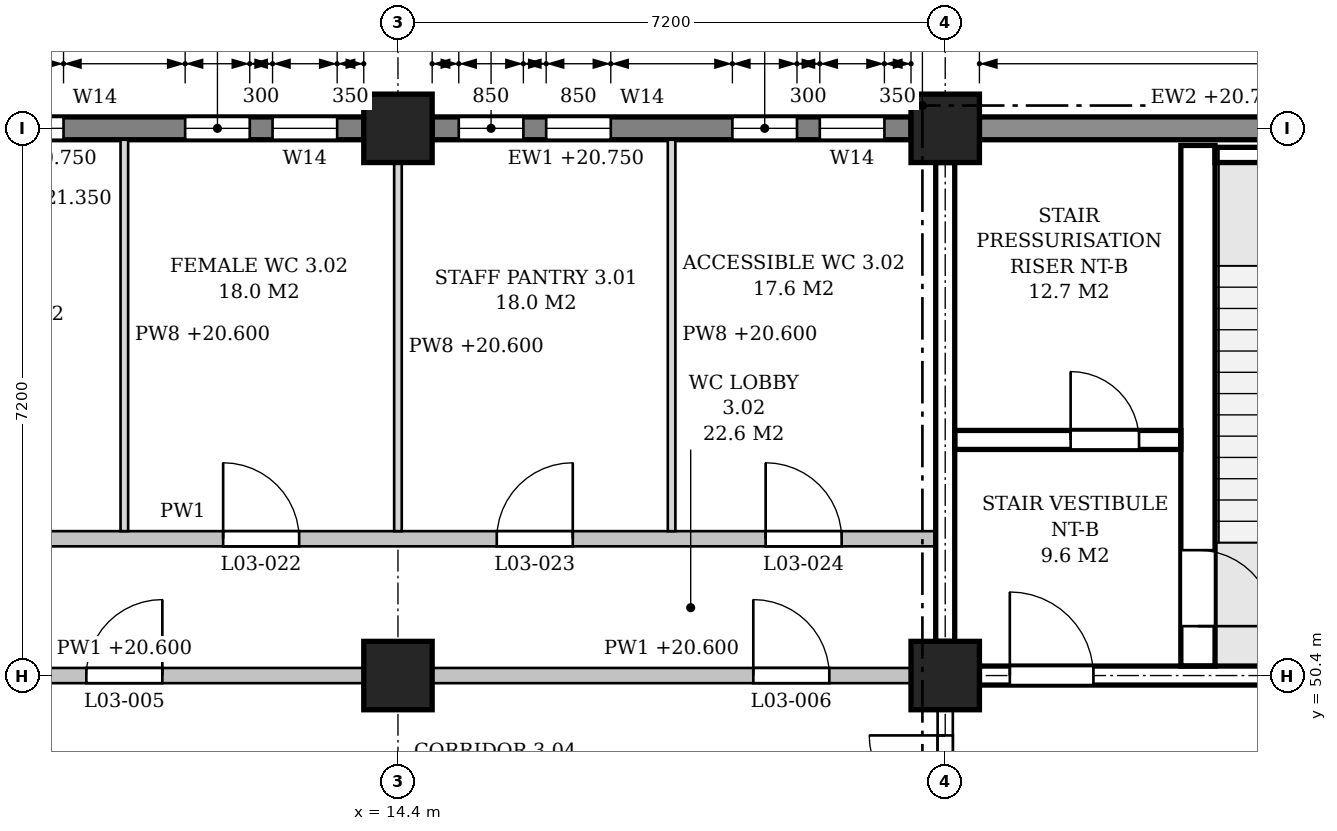
"""IFC4 building model, lengths in metres.
Left out: names, types, materials, properties, quantities, classifications, styles, units other than length and angle.
Written with IfcOpenShell. Run it as: python <this file> out.ifc"""

import sys

from ifc_helpers import new_model, si_unit, direction, frame, frame_2d, origin, origin_2d, place, context, subcontext, project, spatial, polyline, rectangle, outline, extrude, element, fill, save


model = new_model("IFC4")
c1 = context("Model", 3, precision=1e-05, world=origin(), true_north=direction((0.0, 1.0)))
c2 = subcontext(c1, "Body", "Model", "MODEL_VIEW")
j1 = project(units=[si_unit("LENGTHUNIT", "METRE"), si_unit("PLANEANGLEUNIT", "RADIAN")], contexts=[c1])
p1 = place(None, origin())
s1 = spatial("IfcSite", under=j1, at=p1, CompositionType="ELEMENT")
p2 = place(p1, origin())
s2 = spatial("IfcBuilding", under=s1, at=p2, CompositionType="ELEMENT")
p3 = place(p2, frame((0.0, 0.0, 16.8)))
s3 = spatial("IfcBuildingStorey", under=s2, at=p3, CompositionType="ELEMENT", Elevation=16.8)
for number, where, z_axis, x_axis in (
    (1, (14.4, 50.4, 0.0), (0.0, 0.0, 1.0), (1.0, 0.0, 0.0)),
    (2, (14.4, 57.6, 0.0), (0.0, 0.0, 1.0), (1.0, 0.0, 0.0)),
    (3, (21.6, 50.4, 0.0), (0.0, 0.0, 1.0), (1.0, 0.0, 0.0)),
    (4, (21.6, 57.6, 0.0), (0.0, 0.0, 1.0), (1.0, 0.0, 0.0)),
):
    element("IfcColumn", number, at=place(p3, frame(where, z_axis=z_axis, x_axis=x_axis)), inside=s3, PredefinedType="COLUMN", context=c2, shape_type="SweptSolid", body=[
        extrude(rectangle(XDim=0.9, YDim=0.9, at=origin_2d()), origin(), (0.0, 0.0, 1.0), 4.8),
    ])
p4 = place(p3, frame((28.35, 57.6, 0.0), z_axis=(0.0, 0.0, 1.0), x_axis=(-1.0, 0.0, 0.0)))
e5 = element("IfcWall", 5, at=p4, inside=s3, PredefinedType="STANDARD", context=c2, shape_type="SweptSolid", body=[
    extrude(rectangle(XDim=6.3, YDim=0.3, at=frame_2d((3.15, 0.0))), origin(), (0.0, 0.0, 1.0), 3.95),
])
p5 = place(p4, frame((0.9, 0.0, 0.9)))
e6 = element("IfcOpeningElement", 6, at=p5, cuts=e5, PredefinedType="OPENING", context=c2, shape_type="SweptSolid", body=[
    extrude(outline(polyline([(0.0, 0.0), (0.9, 0.0), (0.9, 2.05), (0.45, 2.5), (0.0, 2.05), (0.0, 0.0)])), frame((0.0, 0.16, 0.0), z_axis=(0.0, -1.0, 0.0), x_axis=(1.0, 0.0, 0.0)), (0.0, 0.0, 1.0), 0.32),
])
p6 = place(p3, frame((21.15, 57.6, 0.0), z_axis=(0.0, 0.0, 1.0), x_axis=(-1.0, 0.0, 0.0)))
e7 = element("IfcWall", 7, at=p6, inside=s3, PredefinedType="STANDARD", context=c2, shape_type="SweptSolid", body=[
    extrude(rectangle(XDim=6.3, YDim=0.3, at=frame_2d((3.15, 0.0))), origin(), (0.0, 0.0, 1.0), 3.95),
])
p7 = place(p6, frame((0.35, 0.0, 0.9)))
e8 = element("IfcOpeningElement", 8, at=p7, cuts=e7, PredefinedType="OPENING", context=c2, shape_type="SweptSolid", body=[
    extrude(outline(polyline([(0.0, 0.0), (0.85, 0.0), (0.85, 2.05), (0.425, 2.5), (0.0, 2.05), (0.0, 0.0)])), frame((0.0, 0.16, 0.0), z_axis=(0.0, -1.0, 0.0), x_axis=(1.0, 0.0, 0.0)), (0.0, 0.0, 1.0), 0.32),
])
p8 = place(p6, frame((1.5, 0.0, 0.9)))
e9 = element("IfcOpeningElement", 9, at=p8, cuts=e7, PredefinedType="OPENING", context=c2, shape_type="SweptSolid", body=[
    extrude(outline(polyline([(0.0, 0.0), (0.85, 0.0), (0.85, 2.05), (0.425, 2.5), (0.0, 2.05), (0.0, 0.0)])), frame((0.0, 0.16, 0.0), z_axis=(0.0, -1.0, 0.0), x_axis=(1.0, 0.0, 0.0)), (0.0, 0.0, 1.0), 0.32),
])
p9 = place(p6, frame((3.95, 0.0, 0.9)))
e10 = element("IfcOpeningElement", 10, at=p9, cuts=e7, PredefinedType="OPENING", context=c2, shape_type="SweptSolid", body=[
    extrude(outline(polyline([(0.0, 0.0), (0.85, 0.0), (0.85, 2.05), (0.425, 2.5), (0.0, 2.05), (0.0, 0.0)])), frame((0.0, 0.16, 0.0), z_axis=(0.0, -1.0, 0.0), x_axis=(1.0, 0.0, 0.0)), (0.0, 0.0, 1.0), 0.32),
])
p10 = place(p6, frame((5.1, 0.0, 0.9)))
e11 = element("IfcOpeningElement", 11, at=p10, cuts=e7, PredefinedType="OPENING", context=c2, shape_type="SweptSolid", body=[
    extrude(outline(polyline([(0.0, 0.0), (0.85, 0.0), (0.85, 2.05), (0.425, 2.5), (0.0, 2.05), (0.0, 0.0)])), frame((0.0, 0.16, 0.0), z_axis=(0.0, -1.0, 0.0), x_axis=(1.0, 0.0, 0.0)), (0.0, 0.0, 1.0), 0.32),
])
p11 = place(p3, frame((13.95, 57.6, 0.0), z_axis=(0.0, 0.0, 1.0), x_axis=(-1.0, 0.0, 0.0)))
e12 = element("IfcWall", 12, at=p11, inside=s3, PredefinedType="STANDARD", context=c2, shape_type="SweptSolid", body=[
    extrude(rectangle(XDim=6.3, YDim=0.3, at=frame_2d((3.15, 0.0))), origin(), (0.0, 0.0, 1.0), 3.95),
])
p12 = place(p11, frame((0.35, 0.0, 0.9)))
e13 = element("IfcOpeningElement", 13, at=p12, cuts=e12, PredefinedType="OPENING", context=c2, shape_type="SweptSolid", body=[
    extrude(outline(polyline([(0.0, 0.0), (0.85, 0.0), (0.85, 2.05), (0.425, 2.5), (0.0, 2.05), (0.0, 0.0)])), frame((0.0, 0.16, 0.0), z_axis=(0.0, -1.0, 0.0), x_axis=(1.0, 0.0, 0.0)), (0.0, 0.0, 1.0), 0.32),
])
p13 = place(p11, frame((1.5, 0.0, 0.9)))
e14 = element("IfcOpeningElement", 14, at=p13, cuts=e12, PredefinedType="OPENING", context=c2, shape_type="SweptSolid", body=[
    extrude(outline(polyline([(0.0, 0.0), (0.85, 0.0), (0.85, 2.05), (0.425, 2.5), (0.0, 2.05), (0.0, 0.0)])), frame((0.0, 0.16, 0.0), z_axis=(0.0, -1.0, 0.0), x_axis=(1.0, 0.0, 0.0)), (0.0, 0.0, 1.0), 0.32),
])
p14 = place(p11, frame((3.95, 0.0, 0.9)))
e15 = element("IfcOpeningElement", 15, at=p14, cuts=e12, PredefinedType="OPENING", context=c2, shape_type="SweptSolid", body=[
    extrude(outline(polyline([(0.0, 0.0), (0.85, 0.0), (0.85, 2.05), (0.425, 2.5), (0.0, 2.05), (0.0, 0.0)])), frame((0.0, 0.16, 0.0), z_axis=(0.0, -1.0, 0.0), x_axis=(1.0, 0.0, 0.0)), (0.0, 0.0, 1.0), 0.32),
])
p15 = place(p11, frame((5.1, 0.0, 0.9)))
e16 = element("IfcOpeningElement", 16, at=p15, cuts=e12, PredefinedType="OPENING", context=c2, shape_type="SweptSolid", body=[
    extrude(outline(polyline([(0.0, 0.0), (0.85, 0.0), (0.85, 2.05), (0.425, 2.5), (0.0, 2.05), (0.0, 0.0)])), frame((0.0, 0.16, 0.0), z_axis=(0.0, -1.0, 0.0), x_axis=(1.0, 0.0, 0.0)), (0.0, 0.0, 1.0), 0.32),
])
p16 = place(p3, frame((22.05, 50.4, 0.0), z_axis=(0.0, 0.0, 1.0), x_axis=(1.0, 0.0, 0.0)))
e17 = element("IfcWall", 17, at=p16, inside=s3, PredefinedType="SHEAR", context=c2, shape_type="SweptSolid", body=[
    extrude(rectangle(XDim=6.3, YDim=0.25, at=frame_2d((3.15, 0.0))), origin(), (0.0, 0.0, 1.0), 3.8),
])
p17 = place(p16, frame((0.4, 0.0, 0.0)))
e18 = element("IfcOpeningElement", 18, at=p17, cuts=e17, PredefinedType="OPENING", context=c2, shape_type="SweptSolid", body=[
    extrude(rectangle(XDim=1.1, YDim=2.1, at=frame_2d((0.55, 1.05))), frame((0.0, 0.135, 0.0), z_axis=(0.0, -1.0, 0.0), x_axis=(1.0, 0.0, 0.0)), (0.0, 0.0, 1.0), 0.27),
])
p18 = place(p3, frame((21.6, 50.85, 0.0), z_axis=(0.0, 0.0, 1.0), x_axis=(0.0, 1.0, 0.0)))
e19 = element("IfcWall", 19, at=p18, inside=s3, PredefinedType="SHEAR", context=c2, shape_type="SweptSolid", body=[
    extrude(rectangle(XDim=6.3, YDim=0.25, at=frame_2d((3.15, 0.0))), origin(), (0.0, 0.0, 1.0), 3.8),
])
p19 = place(p3, frame((25.15, 57.25, -0.25), z_axis=(0.0, 0.0, 1.0), x_axis=(1.0, 0.0, 0.0)))
e20 = element("IfcWall", 20, at=p19, inside=s3, PredefinedType="SHEAR", context=c2, shape_type="SweptSolid", body=[
    extrude(rectangle(XDim=1.4, YDim=0.2, at=frame_2d((0.7, 0.0))), origin(), (0.0, 0.0, 1.0), 4.8),
])
p20 = place(p3, frame((24.925, 50.525, 0.0), z_axis=(0.0, 0.0, 1.0), x_axis=(0.0, 1.0, 0.0)))
e21 = element("IfcWall", 21, at=p20, inside=s3, PredefinedType="SHEAR", context=c2, shape_type="SweptSolid", body=[
    extrude(rectangle(XDim=6.85, YDim=0.45, at=frame_2d((3.425, 0.0))), origin(), (0.0, 0.0, 1.0), 4.55),
])
p21 = place(p20, frame((0.525, 0.0, 0.0)))
e22 = element("IfcOpeningElement", 22, at=p21, cuts=e21, PredefinedType="OPENING", context=c2, shape_type="SweptSolid", body=[
    extrude(rectangle(XDim=1.0, YDim=2.1, at=frame_2d((0.5, 1.05))), frame((0.0, 0.235, 0.0), z_axis=(0.0, -1.0, 0.0), x_axis=(1.0, 0.0, 0.0)), (0.0, 0.0, 1.0), 0.47),
])
p22 = place(p3, frame((21.725, 53.5, 0.0), z_axis=(0.0, 0.0, 1.0), x_axis=(1.0, 0.0, 0.0)))
e23 = element("IfcWall", 23, at=p22, inside=s3, PredefinedType="SHEAR", context=c2, shape_type="SweptSolid", body=[
    extrude(rectangle(XDim=2.975, YDim=0.25, at=frame_2d((1.487, 0.0))), origin(), (0.0, 0.0, 1.0), 4.55),
])
p23 = place(p22, frame((1.525, 0.0, 0.0)))
e24 = element("IfcOpeningElement", 24, at=p23, cuts=e23, PredefinedType="OPENING", context=c2, shape_type="SweptSolid", body=[
    extrude(rectangle(XDim=0.9, YDim=2.1, at=frame_2d((0.45, 1.05))), frame((0.0, 0.135, 0.0), z_axis=(0.0, -1.0, 0.0), x_axis=(1.0, 0.0, 0.0)), (0.0, 0.0, 1.0), 0.27),
])
p24 = place(p3, frame((7.65, 50.4, 0.0), z_axis=(0.0, 0.0, 1.0), x_axis=(1.0, 0.0, 0.0)))
e25 = element("IfcWall", 25, at=p24, inside=s3, PredefinedType="PARTITIONING", context=c2, shape_type="SweptSolid", body=[
    extrude(rectangle(XDim=6.3, YDim=0.2, at=frame_2d((3.15, 0.0))), origin(), (0.0, 0.0, 1.0), 3.8),
])
p25 = place(p24, frame((2.65, 0.0, 0.0)))
e26 = element("IfcOpeningElement", 26, at=p25, cuts=e25, PredefinedType="OPENING", context=c2, shape_type="SweptSolid", body=[
    extrude(rectangle(XDim=1.0, YDim=2.1, at=frame_2d((0.5, 1.05))), frame((0.0, 0.11, 0.0), z_axis=(0.0, -1.0, 0.0), x_axis=(1.0, 0.0, 0.0)), (0.0, 0.0, 1.0), 0.22),
])
p26 = place(p3, frame((14.85, 50.4, 0.0), z_axis=(0.0, 0.0, 1.0), x_axis=(1.0, 0.0, 0.0)))
e27 = element("IfcWall", 27, at=p26, inside=s3, PredefinedType="PARTITIONING", context=c2, shape_type="SweptSolid", body=[
    extrude(rectangle(XDim=6.3, YDim=0.2, at=frame_2d((3.15, 0.0))), origin(), (0.0, 0.0, 1.0), 3.8),
])
p27 = place(p26, frame((4.225, 0.0, 0.0)))
e28 = element("IfcOpeningElement", 28, at=p27, cuts=e27, PredefinedType="OPENING", context=c2, shape_type="SweptSolid", body=[
    extrude(rectangle(XDim=1.0, YDim=2.1, at=frame_2d((0.5, 1.05))), frame((0.0, 0.11, 0.0), z_axis=(0.0, -1.0, 0.0), x_axis=(1.0, 0.0, 0.0)), (0.0, 0.0, 1.0), 0.22),
])
p28 = place(p3, frame((7.325, 52.2, 0.0), z_axis=(0.0, 0.0, 1.0), x_axis=(1.0, 0.0, 0.0)))
e29 = element("IfcWall", 29, at=p28, inside=s3, PredefinedType="PARTITIONING", context=c2, shape_type="SweptSolid", body=[
    extrude(outline(polyline([(0.0, 0.0), (14.15, 0.0), (14.15, 3.8), (14.025, 3.8), (14.025, 4.55), (7.325, 4.55), (7.325, 3.8), (6.825, 3.8), (6.825, 4.55), (0.125, 4.55), (0.125, 3.8), (0.0, 3.8), (0.0, 0.0)])), frame((0.0, 0.1, 0.0), z_axis=(0.0, -1.0, 0.0), x_axis=(1.0, 0.0, 0.0)), (0.0, 0.0, 1.0), 0.2),
])
p29 = place(p28, frame((1.238, 0.0, 0.0)))
e30 = element("IfcOpeningElement", 30, at=p29, cuts=e29, PredefinedType="OPENING", context=c2, shape_type="SweptSolid", body=[
    extrude(rectangle(XDim=1.0, YDim=2.1, at=frame_2d((0.5, 1.05))), frame((0.0, 0.11, 0.0), z_axis=(0.0, -1.0, 0.0), x_axis=(1.0, 0.0, 0.0)), (0.0, 0.0, 1.0), 0.22),
])
p30 = place(p28, frame((4.775, 0.0, 0.0)))
e31 = element("IfcOpeningElement", 31, at=p30, cuts=e29, PredefinedType="OPENING", context=c2, shape_type="SweptSolid", body=[
    extrude(rectangle(XDim=1.0, YDim=2.1, at=frame_2d((0.5, 1.05))), frame((0.0, 0.11, 0.0), z_axis=(0.0, -1.0, 0.0), x_axis=(1.0, 0.0, 0.0)), (0.0, 0.0, 1.0), 0.22),
])
p31 = place(p28, frame((8.375, 0.0, 0.0)))
e32 = element("IfcOpeningElement", 32, at=p31, cuts=e29, PredefinedType="OPENING", context=c2, shape_type="SweptSolid", body=[
    extrude(rectangle(XDim=1.0, YDim=2.1, at=frame_2d((0.5, 1.05))), frame((0.0, 0.11, 0.0), z_axis=(0.0, -1.0, 0.0), x_axis=(1.0, 0.0, 0.0)), (0.0, 0.0, 1.0), 0.22),
])
p32 = place(p28, frame((11.913, 0.0, 0.0)))
e33 = element("IfcOpeningElement", 33, at=p32, cuts=e29, PredefinedType="OPENING", context=c2, shape_type="SweptSolid", body=[
    extrude(rectangle(XDim=1.0, YDim=2.1, at=frame_2d((0.5, 1.05))), frame((0.0, 0.11, 0.0), z_axis=(0.0, -1.0, 0.0), x_axis=(1.0, 0.0, 0.0)), (0.0, 0.0, 1.0), 0.22),
])
p33 = place(p3, frame((10.8, 52.3, 0.0), z_axis=(0.0, 0.0, 1.0), x_axis=(0.0, 1.0, 0.0)))
e34 = element("IfcWall", 34, at=p33, inside=s3, PredefinedType="PARTITIONING", context=c2, shape_type="SweptSolid", body=[
    extrude(rectangle(XDim=5.15, YDim=0.1, at=frame_2d((2.575, 0.0))), origin(), (0.0, 0.0, 1.0), 3.8),
])
p34 = place(p3, frame((14.4, 52.3, 0.0), z_axis=(0.0, 0.0, 1.0), x_axis=(0.0, 1.0, 0.0)))
e35 = element("IfcWall", 35, at=p34, inside=s3, PredefinedType="PARTITIONING", context=c2, shape_type="SweptSolid", body=[
    extrude(rectangle(XDim=4.85, YDim=0.1, at=frame_2d((2.425, 0.0))), origin(), (0.0, 0.0, 1.0), 3.8),
])
p35 = place(p3, frame((18.0, 52.3, 0.0), z_axis=(0.0, 0.0, 1.0), x_axis=(0.0, 1.0, 0.0)))
e36 = element("IfcWall", 36, at=p35, inside=s3, PredefinedType="PARTITIONING", context=c2, shape_type="SweptSolid", body=[
    extrude(rectangle(XDim=5.15, YDim=0.1, at=frame_2d((2.575, 0.0))), origin(), (0.0, 0.0, 1.0), 3.8),
])
p36 = place(p3, frame((21.6, 47.275, 0.0), z_axis=(0.0, 0.0, 1.0), x_axis=(0.0, 1.0, 0.0)))
e37 = element("IfcWall", 37, at=p36, inside=s3, PredefinedType="PARTITIONING", context=c2, shape_type="SweptSolid", body=[
    extrude(rectangle(XDim=2.675, YDim=0.2, at=frame_2d((1.337, 0.0))), origin(), (0.0, 0.0, 1.0), 3.8),
])
p37 = place(p36, frame((0.337, 0.0, 0.0)))
e38 = element("IfcOpeningElement", 38, at=p37, cuts=e37, PredefinedType="OPENING", context=c2, shape_type="SweptSolid", body=[
    extrude(rectangle(XDim=2.0, YDim=2.4, at=frame_2d((1.0, 1.2))), frame((0.0, 0.11, 0.0), z_axis=(0.0, -1.0, 0.0), x_axis=(1.0, 0.0, 0.0)), (0.0, 0.0, 1.0), 0.22),
])
p38 = place(p7, origin())
e39 = element("IfcWindow", 39, at=p38, inside=s3, PartitioningType="SINGLE_PANEL", PredefinedType="WINDOW", context=c2, shape_type="SweptSolid", body=[
    extrude(outline(polyline([(0.0, 0.0), (0.85, 0.0), (0.85, 2.05), (0.425, 2.5), (0.0, 2.05), (0.0, 0.0)])), frame((0.0, 0.03, 0.0), z_axis=(0.0, -1.0, 0.0), x_axis=(1.0, 0.0, 0.0)), (0.0, 0.0, 1.0), 0.06),
])
fill(e8, e39)
p39 = place(p8, origin())
e40 = element("IfcWindow", 40, at=p39, inside=s3, PartitioningType="SINGLE_PANEL", PredefinedType="WINDOW", context=c2, shape_type="SweptSolid", body=[
    extrude(outline(polyline([(0.0, 0.0), (0.85, 0.0), (0.85, 2.05), (0.425, 2.5), (0.0, 2.05), (0.0, 0.0)])), frame((0.0, 0.03, 0.0), z_axis=(0.0, -1.0, 0.0), x_axis=(1.0, 0.0, 0.0)), (0.0, 0.0, 1.0), 0.06),
])
fill(e9, e40)
p40 = place(p9, origin())
e41 = element("IfcWindow", 41, at=p40, inside=s3, PartitioningType="SINGLE_PANEL", PredefinedType="WINDOW", context=c2, shape_type="SweptSolid", body=[
    extrude(outline(polyline([(0.0, 0.0), (0.85, 0.0), (0.85, 2.05), (0.425, 2.5), (0.0, 2.05), (0.0, 0.0)])), frame((0.0, 0.03, 0.0), z_axis=(0.0, -1.0, 0.0), x_axis=(1.0, 0.0, 0.0)), (0.0, 0.0, 1.0), 0.06),
])
fill(e10, e41)
p41 = place(p10, origin())
e42 = element("IfcWindow", 42, at=p41, inside=s3, PartitioningType="SINGLE_PANEL", PredefinedType="WINDOW", context=c2, shape_type="SweptSolid", body=[
    extrude(outline(polyline([(0.0, 0.0), (0.85, 0.0), (0.85, 2.05), (0.425, 2.5), (0.0, 2.05), (0.0, 0.0)])), frame((0.0, 0.03, 0.0), z_axis=(0.0, -1.0, 0.0), x_axis=(1.0, 0.0, 0.0)), (0.0, 0.0, 1.0), 0.06),
])
fill(e11, e42)
p42 = place(p12, origin())
e43 = element("IfcWindow", 43, at=p42, inside=s3, PartitioningType="SINGLE_PANEL", PredefinedType="WINDOW", context=c2, shape_type="SweptSolid", body=[
    extrude(outline(polyline([(0.0, 0.0), (0.85, 0.0), (0.85, 2.05), (0.425, 2.5), (0.0, 2.05), (0.0, 0.0)])), frame((0.0, 0.03, 0.0), z_axis=(0.0, -1.0, 0.0), x_axis=(1.0, 0.0, 0.0)), (0.0, 0.0, 1.0), 0.06),
])
fill(e13, e43)
p43 = place(p13, origin())
e44 = element("IfcWindow", 44, at=p43, inside=s3, PartitioningType="SINGLE_PANEL", PredefinedType="WINDOW", context=c2, shape_type="SweptSolid", body=[
    extrude(outline(polyline([(0.0, 0.0), (0.85, 0.0), (0.85, 2.05), (0.425, 2.5), (0.0, 2.05), (0.0, 0.0)])), frame((0.0, 0.03, 0.0), z_axis=(0.0, -1.0, 0.0), x_axis=(1.0, 0.0, 0.0)), (0.0, 0.0, 1.0), 0.06),
])
fill(e14, e44)
p44 = place(p14, origin())
e45 = element("IfcWindow", 45, at=p44, inside=s3, PartitioningType="SINGLE_PANEL", PredefinedType="WINDOW", context=c2, shape_type="SweptSolid", body=[
    extrude(outline(polyline([(0.0, 0.0), (0.85, 0.0), (0.85, 2.05), (0.425, 2.5), (0.0, 2.05), (0.0, 0.0)])), frame((0.0, 0.03, 0.0), z_axis=(0.0, -1.0, 0.0), x_axis=(1.0, 0.0, 0.0)), (0.0, 0.0, 1.0), 0.06),
])
fill(e15, e45)
p45 = place(p21, frame((1.0, 0.0, 0.0), z_axis=(0.0, 0.0, 1.0), x_axis=(-1.0, 0.0, 0.0)))
e46 = element("IfcDoor", 46, at=p45, inside=s3, OperationType="SINGLE_SWING_RIGHT", PredefinedType="DOOR", context=c2, shape_type="SweptSolid", body=[
    extrude(rectangle(XDim=1.0, YDim=2.1, at=frame_2d((0.5, 1.05))), frame((0.0, 0.025, 0.0), z_axis=(0.0, -1.0, 0.0), x_axis=(1.0, 0.0, 0.0)), (0.0, 0.0, 1.0), 0.05),
])
fill(e22, e46)
p46 = place(p17, origin())
e47 = element("IfcDoor", 47, at=p46, inside=s3, OperationType="SINGLE_SWING_LEFT", PredefinedType="DOOR", context=c2, shape_type="SweptSolid", body=[
    extrude(rectangle(XDim=1.1, YDim=2.1, at=frame_2d((0.55, 1.05))), frame((0.0, 0.025, 0.0), z_axis=(0.0, -1.0, 0.0), x_axis=(1.0, 0.0, 0.0)), (0.0, 0.0, 1.0), 0.05),
])
fill(e18, e47)
p47 = place(p23, origin())
e48 = element("IfcDoor", 48, at=p47, inside=s3, OperationType="SINGLE_SWING_LEFT", PredefinedType="DOOR", context=c2, shape_type="SweptSolid", body=[
    extrude(rectangle(XDim=0.9, YDim=2.1, at=frame_2d((0.45, 1.05))), frame((0.0, 0.025, 0.0), z_axis=(0.0, -1.0, 0.0), x_axis=(1.0, 0.0, 0.0)), (0.0, 0.0, 1.0), 0.05),
])
fill(e24, e48)
p48 = place(p37, origin())
e49 = element("IfcDoor", 49, at=p48, inside=s3, OperationType="DOUBLE_DOOR_SINGLE_SWING", PredefinedType="DOOR", context=c2, shape_type="SweptSolid", body=[
    extrude(rectangle(XDim=2.0, YDim=2.4, at=frame_2d((1.0, 1.2))), frame((0.0, 0.025, 0.0), z_axis=(0.0, -1.0, 0.0), x_axis=(1.0, 0.0, 0.0)), (0.0, 0.0, 1.0), 0.05),
])
fill(e38, e49)
p49 = place(p25, origin())
e50 = element("IfcDoor", 50, at=p49, inside=s3, OperationType="SINGLE_SWING_RIGHT", PredefinedType="DOOR", context=c2, shape_type="SweptSolid", body=[
    extrude(rectangle(XDim=1.0, YDim=2.1, at=frame_2d((0.5, 1.05))), frame((0.0, 0.025, 0.0), z_axis=(0.0, -1.0, 0.0), x_axis=(1.0, 0.0, 0.0)), (0.0, 0.0, 1.0), 0.05),
])
fill(e26, e50)
p50 = place(p27, origin())
e51 = element("IfcDoor", 51, at=p50, inside=s3, OperationType="SINGLE_SWING_LEFT", PredefinedType="DOOR", context=c2, shape_type="SweptSolid", body=[
    extrude(rectangle(XDim=1.0, YDim=2.1, at=frame_2d((0.5, 1.05))), frame((0.0, 0.025, 0.0), z_axis=(0.0, -1.0, 0.0), x_axis=(1.0, 0.0, 0.0)), (0.0, 0.0, 1.0), 0.05),
])
fill(e28, e51)
p51 = place(p30, origin())
e52 = element("IfcDoor", 52, at=p51, inside=s3, OperationType="SINGLE_SWING_LEFT", PredefinedType="DOOR", context=c2, shape_type="SweptSolid", body=[
    extrude(rectangle(XDim=1.0, YDim=2.1, at=frame_2d((0.5, 1.05))), frame((0.0, 0.025, 0.0), z_axis=(0.0, -1.0, 0.0), x_axis=(1.0, 0.0, 0.0)), (0.0, 0.0, 1.0), 0.05),
])
fill(e31, e52)
p52 = place(p31, origin())
e53 = element("IfcDoor", 53, at=p52, inside=s3, OperationType="SINGLE_SWING_RIGHT", PredefinedType="DOOR", context=c2, shape_type="SweptSolid", body=[
    extrude(rectangle(XDim=1.0, YDim=2.1, at=frame_2d((0.5, 1.05))), frame((0.0, 0.025, 0.0), z_axis=(0.0, -1.0, 0.0), x_axis=(1.0, 0.0, 0.0)), (0.0, 0.0, 1.0), 0.05),
])
fill(e32, e53)
p53 = place(p32, origin())
e54 = element("IfcDoor", 54, at=p53, inside=s3, OperationType="SINGLE_SWING_LEFT", PredefinedType="DOOR", context=c2, shape_type="SweptSolid", body=[
    extrude(rectangle(XDim=1.0, YDim=2.1, at=frame_2d((0.5, 1.05))), frame((0.0, 0.025, 0.0), z_axis=(0.0, -1.0, 0.0), x_axis=(1.0, 0.0, 0.0)), (0.0, 0.0, 1.0), 0.05),
])
fill(e33, e54)
save(model, sys.argv[1])
